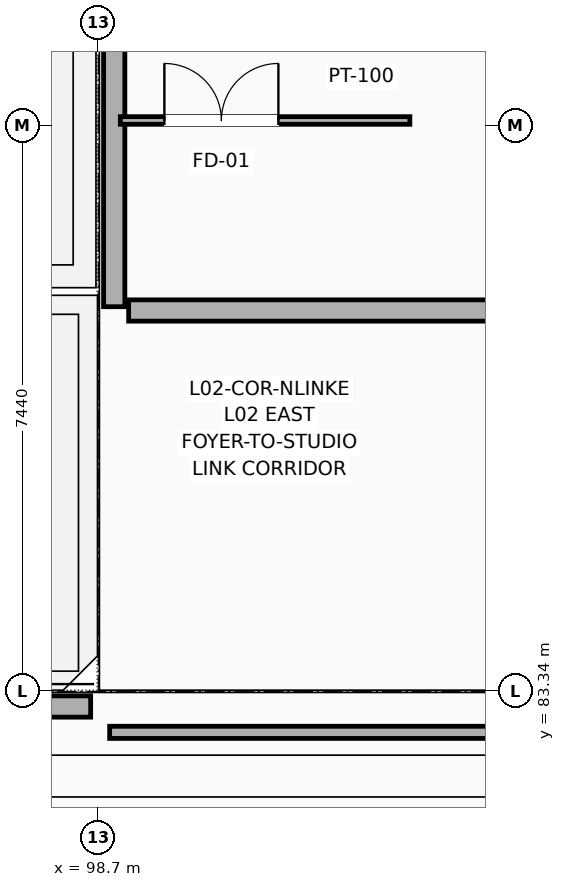
"""IFC4 building model, lengths in metres.
Left out: names, types, materials, properties, quantities, classifications, styles, units other than length and angle.
Written with IfcOpenShell. Run it as: python <this file> out.ifc"""

import sys

from ifc_helpers import new_model, si_unit, direction, frame, frame_2d, origin, place, context, subcontext, project, spatial, rectangle, extrude, element, fill, save


model = new_model("IFC4")
c1 = context("Model", 3, precision=1e-05, world=origin(), true_north=direction((0.0, 1.0)))
c2 = subcontext(c1, "Body", "Model", "MODEL_VIEW")
j1 = project(units=[si_unit("LENGTHUNIT", "METRE"), si_unit("PLANEANGLEUNIT", "RADIAN")], contexts=[c1])
p1 = place(None, origin())
s1 = spatial("IfcSite", under=j1, at=p1, CompositionType="ELEMENT")
p2 = place(p1, origin())
s2 = spatial("IfcBuilding", under=s1, at=p2, CompositionType="ELEMENT")
p3 = place(p2, frame((0.0, 0.0, 10.2)))
s3 = spatial("IfcBuildingStorey", under=s2, at=p3, CompositionType="ELEMENT", Elevation=10.2)
p4 = place(p3, frame((98.91, 88.4, 0.0), z_axis=(0.0, 0.0, 1.0), x_axis=(0.0, 1.0, 0.0)))
e1 = element("IfcWall", 1, at=p4, inside=s3, PredefinedType="SOLIDWALL", context=c2, shape_type="SweptSolid", body=[
    extrude(rectangle(XDim=5.8, YDim=0.28, at=frame_2d((2.9, 0.0))), origin(), (0.0, 0.0, 1.0), 4.205),
])
p5 = place(p3, frame((90.75, 83.14, 0.0), z_axis=(0.0, 0.0, 1.0), x_axis=(1.0, 0.0, 0.0)))
e2 = element("IfcWall", 2, at=p5, inside=s3, PredefinedType="SOLIDWALL", context=c2, shape_type="SweptSolid", body=[
    extrude(rectangle(XDim=7.85, YDim=0.28, at=frame_2d((3.925, 0.0))), origin(), (0.0, 0.0, 1.0), 4.205),
])
p6 = place(p3, frame((99.1, 88.35, 0.0), z_axis=(0.0, 0.0, 1.0), x_axis=(1.0, 0.0, 0.0)))
e3 = element("IfcWall", 3, at=p6, inside=s3, PredefinedType="SOLIDWALL", context=c2, shape_type="SweptSolid", body=[
    extrude(rectangle(XDim=31.7, YDim=0.28, at=frame_2d((15.85, 0.0))), origin(), (0.0, 0.0, 1.0), 3.607),
])
p7 = place(p6, frame((15.25, 0.0, 0.95)))
e4 = element("IfcOpeningElement", 4, at=p7, cuts=e3, PredefinedType="OPENING", context=c2, shape_type="SweptSolid", body=[
    extrude(rectangle(XDim=1.2, YDim=1.8, at=frame_2d((0.6, 0.9))), frame((0.0, 0.15, 0.0), z_axis=(0.0, -1.0, 0.0), x_axis=(1.0, 0.0, 0.0)), (0.0, 0.0, 1.0), 0.3),
])
p8 = place(p3, frame((98.99, 90.85, 0.0), z_axis=(0.0, 0.0, 1.0), x_axis=(1.0, 0.0, 0.0)))
e5 = element("IfcWall", 5, at=p8, inside=s3, PredefinedType="PARTITIONING", context=c2, shape_type="SweptSolid", body=[
    extrude(rectangle(XDim=3.81, YDim=0.1, at=frame_2d((1.905, 0.0))), origin(), (0.0, 0.0, 1.0), 4.205),
])
p9 = place(p8, frame((0.58, 0.0, 0.0)))
e6 = element("IfcOpeningElement", 6, at=p9, cuts=e5, PredefinedType="OPENING", context=c2, shape_type="SweptSolid", body=[
    extrude(rectangle(XDim=1.5, YDim=2.2, at=frame_2d((0.75, 1.1))), frame((0.0, 0.06, 0.0), z_axis=(0.0, -1.0, 0.0), x_axis=(1.0, 0.0, 0.0)), (0.0, 0.0, 1.0), 0.12),
])
p10 = place(p3, frame((98.85, 82.8, 0.0), z_axis=(0.0, 0.0, 1.0), x_axis=(1.0, 0.0, 0.0)))
e7 = element("IfcWall", 7, at=p10, inside=s3, PredefinedType="PARTITIONING", context=c2, shape_type="SweptSolid", body=[
    extrude(rectangle(XDim=11.55, YDim=0.16, at=frame_2d((5.775, 0.0))), origin(), (0.0, 0.0, 1.0), 3.557),
])
p11 = place(p9, origin())
e8 = element("IfcDoor", 8, at=p11, inside=s3, OperationType="DOUBLE_DOOR_SINGLE_SWING", PredefinedType="DOOR", context=c2, shape_type="SweptSolid", body=[
    extrude(rectangle(XDim=1.5, YDim=2.2, at=frame_2d((0.75, 1.1))), frame((0.0, 0.025, 0.0), z_axis=(0.0, -1.0, 0.0), x_axis=(1.0, 0.0, 0.0)), (0.0, 0.0, 1.0), 0.05),
])
fill(e6, e8)
save(model, sys.argv[1])
